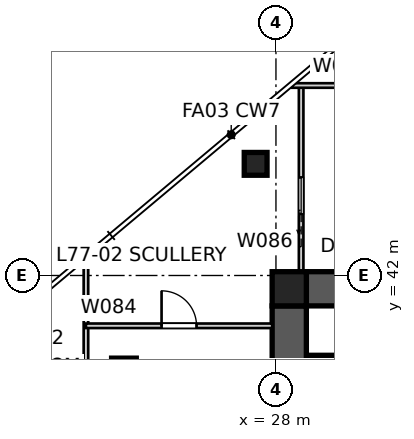
"""IFC4 building model, lengths in metres.
Left out: names, types, materials, properties, quantities, classifications, styles, units other than length and angle.
Written with IfcOpenShell. Run it as: python <this file> out.ifc"""

import sys

from ifc_helpers import new_model, si_unit, direction, frame, frame_2d, origin, origin_2d, place, context, subcontext, project, spatial, polyline, rectangle, outline, extrude, element, fill, save


model = new_model("IFC4")
c1 = context("Model", 3, precision=1e-05, world=origin(), true_north=direction((0.0, 1.0)))
c2 = subcontext(c1, "Body", "Model", "MODEL_VIEW")
j1 = project(units=[si_unit("LENGTHUNIT", "METRE"), si_unit("PLANEANGLEUNIT", "RADIAN")], contexts=[c1])
p1 = place(None, origin())
s1 = spatial("IfcSite", under=j1, at=p1, CompositionType="ELEMENT")
p2 = place(p1, origin())
s2 = spatial("IfcBuilding", under=s1, at=p2, CompositionType="ELEMENT")
p3 = place(p2, frame((0.0, 0.0, 279.4)))
s3 = spatial("IfcBuildingStorey", under=s2, at=p3, CompositionType="ELEMENT", Elevation=279.4)
p4 = place(p3, frame((28.8, 41.65, 0.0), z_axis=(0.0, 0.0, 1.0), x_axis=(1.0, 0.0, 0.0)))
e1 = element("IfcWall", 1, at=p4, inside=s3, PredefinedType="SHEAR", context=c2, shape_type="SweptSolid", body=[
    extrude(outline(polyline([(0.0, -0.45), (22.4, -0.45), (22.4, -0.025), (22.85, -0.025), (22.85, 0.025), (22.4, 0.025), (22.4, 0.45), (0.0, 0.45), (0.0, 0.025), (-0.45, 0.025), (-0.45, -0.025), (0.0, -0.025), (0.0, -0.45)])), origin(), (0.0, 0.0, 1.0), 3.4),
])
p5 = place(p3, frame((28.35, 41.2, 0.0), z_axis=(0.0, 0.0, 1.0), x_axis=(0.0, -1.0, 0.0)))
e2 = element("IfcWall", 2, at=p5, inside=s3, PredefinedType="SHEAR", context=c2, shape_type="SweptSolid", body=[
    extrude(outline(polyline([(0.0, -0.45), (22.4, -0.45), (22.4, -0.025), (22.85, -0.025), (22.85, 0.025), (22.4, 0.025), (22.4, 0.45), (0.0, 0.45), (0.0, 0.025), (-0.45, 0.025), (-0.45, -0.025), (0.0, -0.025), (0.0, -0.45)])), origin(), (0.0, 0.0, 1.0), 3.4),
])
p6 = place(p5, frame((11.14, 0.0, 0.0)))
e3 = element("IfcOpeningElement", 3, at=p6, cuts=e2, PredefinedType="OPENING", context=c2, shape_type="SweptSolid", body=[
    extrude(rectangle(XDim=1.02, YDim=2.4, at=frame_2d((0.51, 1.2))), frame((0.0, 0.46, 0.0), z_axis=(0.0, -1.0, 0.0), x_axis=(1.0, 0.0, 0.0)), (0.0, 0.0, 1.0), 0.92),
])
p7 = place(p3, frame((28.8, 39.75, 0.0), z_axis=(0.0, 0.0, 1.0), x_axis=(1.0, 0.0, 0.0)))
e4 = element("IfcWall", 4, at=p7, inside=s3, PredefinedType="SHEAR", context=c2, shape_type="SweptSolid", body=[
    extrude(rectangle(XDim=3.5, YDim=0.3, at=frame_2d((1.75, 0.0))), origin(), (0.0, 0.0, 1.0), 3.4),
])
p8 = place(p3, frame((28.35, 41.65, 0.0), z_axis=(0.0, 0.0, 1.0), x_axis=(1.0, 0.0, 0.0)))
e5 = element("IfcColumn", 5, at=p8, inside=s3, PredefinedType="COLUMN", context=c2, shape_type="SweptSolid", body=[
    extrude(rectangle(XDim=0.9, YDim=0.9, at=origin_2d()), origin(), (0.0, 0.0, 1.0), 3.4),
])
p9 = place(p3, frame((27.466, 44.938, 0.0), z_axis=(0.0, 0.0, 1.0), x_axis=(1.0, 0.0, 0.0)))
e6 = element("IfcColumn", 6, at=p9, inside=s3, PredefinedType="COLUMN", context=c2, shape_type="SweptSolid", body=[
    extrude(rectangle(XDim=0.6, YDim=0.6, at=origin_2d()), origin(), (0.0, 0.0, 1.0), 3.4),
])
p10 = place(p3, frame((24.0, 39.5, 0.0), z_axis=(0.0, 0.0, 1.0), x_axis=(1.0, 0.0, 0.0)))
e7 = element("IfcColumn", 7, at=p10, inside=s3, PredefinedType="COLUMN", context=c2, shape_type="SweptSolid", body=[
    extrude(rectangle(XDim=0.65, YDim=0.65, at=origin_2d()), origin(), (0.0, 0.0, 1.0), 3.4),
])
p11 = place(p3, frame((23.0, 31.824, 0.0), z_axis=(0.0, 0.0, 1.0), x_axis=(0.0, 1.0, 0.0)))
e8 = element("IfcWall", 8, at=p11, inside=s3, PredefinedType="PARTITIONING", context=c2, shape_type="SweptSolid", body=[
    extrude(rectangle(XDim=10.619, YDim=0.12, at=frame_2d((5.31, 0.0))), origin(), (0.0, 0.0, 1.0), 2.55),
])
p12 = place(p11, frame((0.844, 0.0, 0.0)))
e9 = element("IfcOpeningElement", 9, at=p12, cuts=e8, PredefinedType="OPENING", context=c2, shape_type="SweptSolid", body=[
    extrude(rectangle(XDim=0.92, YDim=2.34, at=frame_2d((0.46, 1.17))), frame((0.0, 0.07, 0.0), z_axis=(0.0, -1.0, 0.0), x_axis=(1.0, 0.0, 0.0)), (0.0, 0.0, 1.0), 0.14),
])
p13 = place(p3, frame((23.0, 40.676, 0.0), z_axis=(0.0, 0.0, 1.0), x_axis=(1.0, 0.0, 0.0)))
e10 = element("IfcWall", 10, at=p13, inside=s3, PredefinedType="PARTITIONING", context=c2, shape_type="SweptSolid", body=[
    extrude(rectangle(XDim=4.9, YDim=0.12, at=frame_2d((2.45, 0.0))), origin(), (0.0, 0.0, 1.0), 3.25),
])
p14 = place(p13, frame((1.99, 0.0, 0.0)))
e11 = element("IfcOpeningElement", 11, at=p14, cuts=e10, PredefinedType="OPENING", context=c2, shape_type="SweptSolid", body=[
    extrude(rectangle(XDim=0.92, YDim=2.1, at=frame_2d((0.46, 1.05))), frame((0.0, 0.07, 0.0), z_axis=(0.0, -1.0, 0.0), x_axis=(1.0, 0.0, 0.0)), (0.0, 0.0, 1.0), 0.14),
])
p15 = place(p3, frame((28.663, 41.18, 0.0), z_axis=(0.0, 0.0, 1.0), x_axis=(0.0, 1.0, 0.0)))
e12 = element("IfcWall", 12, at=p15, inside=s3, PredefinedType="PARTITIONING", context=c2, shape_type="SweptSolid", body=[
    extrude(rectangle(XDim=5.82, YDim=0.12, at=frame_2d((2.91, 0.0))), origin(), (0.0, 0.0, 1.0), 3.25),
])
p16 = place(p15, frame((2.44, 0.0, 0.0)))
e13 = element("IfcOpeningElement", 13, at=p16, cuts=e12, PredefinedType="OPENING", context=c2, shape_type="SweptSolid", body=[
    extrude(rectangle(XDim=0.96, YDim=2.1, at=frame_2d((0.48, 1.05))), frame((0.0, 0.07, 0.0), z_axis=(0.0, -1.0, 0.0), x_axis=(1.0, 0.0, 0.0)), (0.0, 0.0, 1.0), 0.14),
])
p17 = place(p3, frame((28.43, 47.0, 0.0), z_axis=(0.0, 0.0, 1.0), x_axis=(1.0, 0.0, 0.0)))
e14 = element("IfcWall", 14, at=p17, inside=s3, PredefinedType="PARTITIONING", context=c2, shape_type="SweptSolid", body=[
    extrude(rectangle(XDim=4.934, YDim=0.12, at=frame_2d((2.467, 0.0))), origin(), (0.0, 0.0, 1.0), 3.25),
])
p18 = place(p17, frame((2.553, 0.0, 0.0)))
e15 = element("IfcOpeningElement", 15, at=p18, cuts=e14, PredefinedType="OPENING", context=c2, shape_type="SweptSolid", body=[
    extrude(rectangle(XDim=0.96, YDim=2.1, at=frame_2d((0.48, 1.05))), frame((0.0, 0.07, 0.0), z_axis=(0.0, -1.0, 0.0), x_axis=(1.0, 0.0, 0.0)), (0.0, 0.0, 1.0), 0.14),
])
p19 = place(p14, origin())
e16 = element("IfcDoor", 16, at=p19, inside=s3, OperationType="SINGLE_SWING_LEFT", PredefinedType="DOOR", context=c2, shape_type="SweptSolid", body=[
    extrude(rectangle(XDim=0.92, YDim=2.1, at=frame_2d((0.46, 1.05))), frame((0.0, 0.025, 0.0), z_axis=(0.0, -1.0, 0.0), x_axis=(1.0, 0.0, 0.0)), (0.0, 0.0, 1.0), 0.05),
])
fill(e11, e16)
p20 = place(p16, origin())
e17 = element("IfcDoor", 17, at=p20, inside=s3, OperationType="SLIDING_TO_LEFT", PredefinedType="DOOR", context=c2, shape_type="SweptSolid", body=[
    extrude(rectangle(XDim=0.96, YDim=2.1, at=frame_2d((0.48, 1.05))), frame((0.0, 0.025, 0.0), z_axis=(0.0, -1.0, 0.0), x_axis=(1.0, 0.0, 0.0)), (0.0, 0.0, 1.0), 0.05),
])
fill(e13, e17)
save(model, sys.argv[1])
